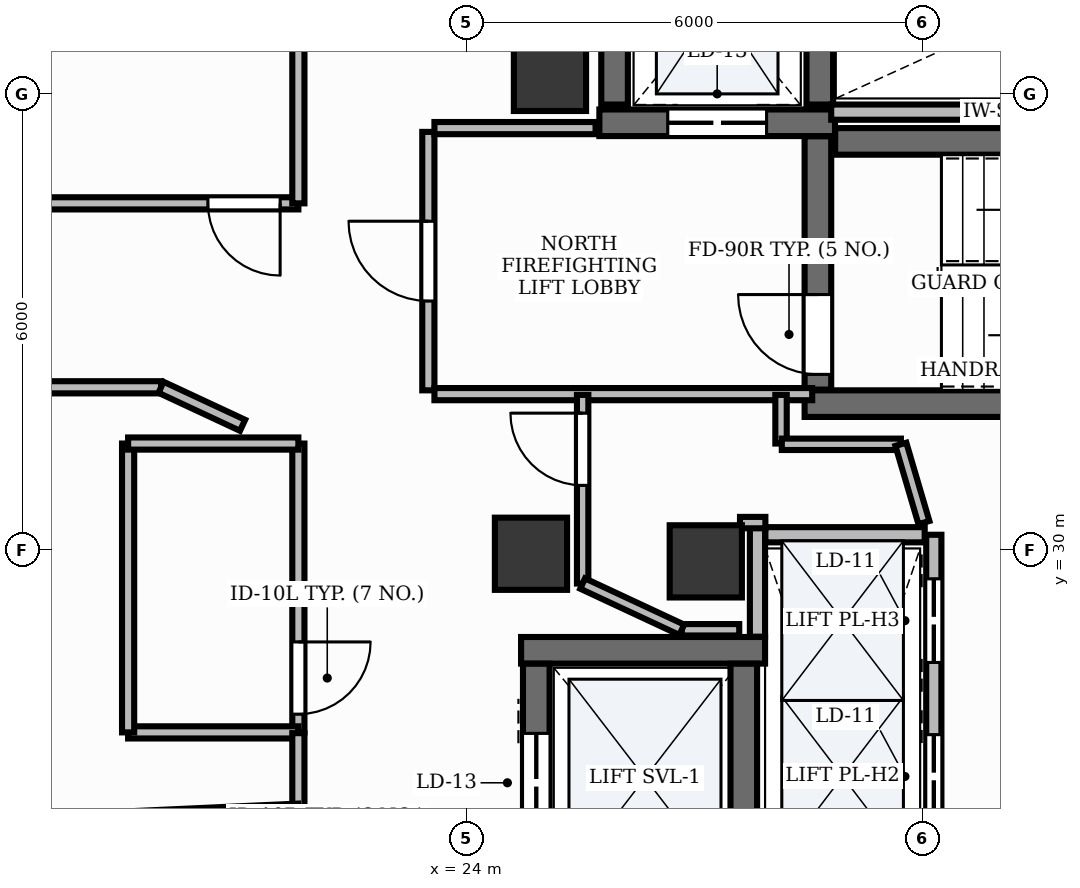
"""IFC4 building model, lengths in metres.
Left out: names, types, materials, properties, quantities, classifications, styles, units other than length and angle.
Written with IfcOpenShell. Run it as: python <this file> out.ifc"""

import sys

from ifc_helpers import new_model, si_unit, direction, frame, frame_2d, origin, origin_2d, place, context, subcontext, project, spatial, rectangle, extrude, element, fill, save


model = new_model("IFC4")
c1 = context("Model", 3, precision=1e-05, world=origin(), true_north=direction((0.0, 1.0)))
c2 = subcontext(c1, "Body", "Model", "MODEL_VIEW")
j1 = project(units=[si_unit("LENGTHUNIT", "METRE"), si_unit("PLANEANGLEUNIT", "RADIAN")], contexts=[c1])
p1 = place(None, origin())
s1 = spatial("IfcSite", under=j1, at=p1, CompositionType="ELEMENT")
p2 = place(p1, origin())
s2 = spatial("IfcBuilding", under=s1, at=p2, CompositionType="ELEMENT")
p3 = place(p2, frame((0.0, 0.0, 310.2)))
s3 = spatial("IfcBuildingStorey", under=s2, at=p3, CompositionType="ELEMENT", Elevation=310.2)
p4 = place(p3, frame((28.852, 35.375, 0.0), z_axis=(0.0, 0.0, 1.0), x_axis=(1.0, 0.0, 0.0)))
e1 = element("IfcWall", 1, at=p4, inside=s3, PredefinedType="SHEAR", context=c2, shape_type="SweptSolid", body=[
    extrude(rectangle(XDim=8.148, YDim=0.35, at=frame_2d((4.074, 0.0))), origin(), (0.0, 0.0, 1.0), 3.9),
])
p5 = place(p3, frame((28.45, 31.925, 0.0), z_axis=(0.0, 0.0, 1.0), x_axis=(1.0, 0.0, 0.0)))
e2 = element("IfcWall", 2, at=p5, inside=s3, PredefinedType="SHEAR", context=c2, shape_type="SweptSolid", body=[
    extrude(rectangle(XDim=8.55, YDim=0.35, at=frame_2d((4.275, 0.0))), origin(), (0.0, 0.0, 1.0), 3.9),
])
p6 = place(p3, frame((28.625, 32.11, 0.0), z_axis=(0.0, 0.0, 1.0), x_axis=(0.0, 1.0, 0.0)))
e3 = element("IfcWall", 3, at=p6, inside=s3, PredefinedType="SHEAR", context=c2, shape_type="SweptSolid", body=[
    extrude(rectangle(XDim=3.333, YDim=0.35, at=frame_2d((1.667, 0.0))), origin(), (0.0, 0.0, 1.0), 3.9),
])
p7 = place(p6, frame((0.2, 0.0, 0.0)))
e4 = element("IfcOpeningElement", 4, at=p7, cuts=e3, PredefinedType="OPENING", context=c2, shape_type="SweptSolid", body=[
    extrude(rectangle(XDim=1.05, YDim=2.15, at=frame_2d((0.525, 1.075))), frame((0.0, 0.19, 0.0), z_axis=(0.0, -1.0, 0.0), x_axis=(1.0, 0.0, 0.0)), (0.0, 0.0, 1.0), 0.38),
])
p8 = place(p3, frame((25.75, 35.62, 0.0), z_axis=(0.0, 0.0, 1.0), x_axis=(1.0, 0.0, 0.0)))
e5 = element("IfcWall", 5, at=p8, inside=s3, PredefinedType="SHEAR", context=c2, shape_type="SweptSolid", body=[
    extrude(rectangle(XDim=3.1, YDim=0.35, at=frame_2d((1.55, 0.0))), origin(), (0.0, 0.0, 1.0), 3.9),
])
p9 = place(p8, frame((0.9, 0.0, 0.0)))
e6 = element("IfcOpeningElement", 6, at=p9, cuts=e5, PredefinedType="OPENING", context=c2, shape_type="SweptSolid", body=[
    extrude(rectangle(XDim=1.3, YDim=2.2, at=frame_2d((0.65, 1.1))), frame((0.0, 0.19, 0.0), z_axis=(0.0, -1.0, 0.0), x_axis=(1.0, 0.0, 0.0)), (0.0, 0.0, 1.0), 0.38),
])
for number, where, z_axis, x_axis in (
    (7, (25.95, 35.86, 0.0), (0.0, 0.0, 1.0), (0.0, 1.0, 0.0)),
    (8, (28.65, 35.86, 0.0), (0.0, 0.0, 1.0), (0.0, 1.0, 0.0)),
):
    element("IfcWall", number, at=place(p3, frame(where, z_axis=z_axis, x_axis=x_axis)), inside=s3, PredefinedType="SHEAR", context=c2, shape_type="SweptSolid", body=[
        extrude(rectangle(XDim=2.7, YDim=0.35, at=frame_2d((1.35, 0.0))), origin(), (0.0, 0.0, 1.0), 3.9),
    ])
p10 = place(p3, frame((24.72, 28.68, 0.0), z_axis=(0.0, 0.0, 1.0), x_axis=(1.0, 0.0, 0.0)))
e9 = element("IfcWall", 9, at=p10, inside=s3, PredefinedType="SHEAR", context=c2, shape_type="SweptSolid", body=[
    extrude(rectangle(XDim=3.21, YDim=0.35, at=frame_2d((1.605, 0.0))), origin(), (0.0, 0.0, 1.0), 3.9),
])
p11 = place(p3, frame((24.92, 25.497, 0.0), z_axis=(0.0, 0.0, 1.0), x_axis=(0.0, 1.0, 0.0)))
e10 = element("IfcWall", 10, at=p11, inside=s3, PredefinedType="SHEAR", context=c2, shape_type="SweptSolid", body=[
    extrude(rectangle(XDim=3.006, YDim=0.35, at=frame_2d((1.503, 0.0))), origin(), (0.0, 0.0, 1.0), 3.9),
])
p12 = place(p11, frame((0.79, 0.0, 0.0)))
e11 = element("IfcOpeningElement", 11, at=p12, cuts=e10, PredefinedType="OPENING", context=c2, shape_type="SweptSolid", body=[
    extrude(rectangle(XDim=1.3, YDim=2.2, at=frame_2d((0.65, 1.1))), frame((0.0, 0.19, 0.0), z_axis=(0.0, -1.0, 0.0), x_axis=(1.0, 0.0, 0.0)), (0.0, 0.0, 1.0), 0.38),
])
p13 = place(p3, frame((27.65, 25.497, 0.0), z_axis=(0.0, 0.0, 1.0), x_axis=(0.0, 1.0, 0.0)))
e12 = element("IfcWall", 12, at=p13, inside=s3, PredefinedType="SHEAR", context=c2, shape_type="SweptSolid", body=[
    extrude(rectangle(XDim=3.006, YDim=0.35, at=frame_2d((1.503, 0.0))), origin(), (0.0, 0.0, 1.0), 3.9),
])
for number, where, z_axis, x_axis in (
    (13, (25.1, 36.25, -0.0), (0.0, 0.0, 1.0), (1.0, 0.0, 0.0)),
    (14, (24.85, 29.95, -0.0), (0.0, 0.0, 1.0), (1.0, 0.0, 0.0)),
    (15, (27.15, 29.85, -0.0), (0.0, 0.0, 1.0), (1.0, 0.0, 0.0)),
):
    element("IfcColumn", number, at=place(p3, frame(where, z_axis=z_axis, x_axis=x_axis)), inside=s3, PredefinedType="PILASTER", context=c2, shape_type="SweptSolid", body=[
        extrude(rectangle(XDim=0.95, YDim=0.95, at=origin_2d()), origin(), (0.0, 0.0, 1.0), 3.901),
    ])
p14 = place(p3, frame((27.83, 28.859, 0.0), z_axis=(0.0, 0.0, 1.0), x_axis=(0.0, 1.0, 0.0)))
e16 = element("IfcWall", 16, at=p14, inside=s3, PredefinedType="PARTITIONING", context=c2, shape_type="SweptSolid", body=[
    extrude(rectangle(XDim=1.441, YDim=0.2, at=frame_2d((0.721, 0.0))), origin(), (0.0, 0.0, 1.0), 2.91),
])
p15 = place(p3, frame((30.15, 23.85, 0.0), z_axis=(0.0, 0.0, 1.0), x_axis=(0.0, 1.0, 0.0)))
e17 = element("IfcWall", 17, at=p15, inside=s3, PredefinedType="PARTITIONING", context=c2, shape_type="SweptSolid", body=[
    extrude(rectangle(XDim=6.35, YDim=0.2, at=frame_2d((3.175, 0.0))), origin(), (0.0, 0.0, 1.0), 2.91),
])
p16 = place(p15, frame((0.58, 0.0, 0.0)))
e18 = element("IfcOpeningElement", 18, at=p16, cuts=e17, PredefinedType="OPENING", context=c2, shape_type="SweptSolid", body=[
    extrude(rectangle(XDim=1.1, YDim=2.2, at=frame_2d((0.55, 1.1))), frame((0.0, 0.115, 0.0), z_axis=(0.0, -1.0, 0.0), x_axis=(1.0, 0.0, 0.0)), (0.0, 0.0, 1.0), 0.23),
])
p17 = place(p15, frame((2.62, 0.0, 0.0)))
e19 = element("IfcOpeningElement", 19, at=p17, cuts=e17, PredefinedType="OPENING", context=c2, shape_type="SweptSolid", body=[
    extrude(rectangle(XDim=1.1, YDim=2.2, at=frame_2d((0.55, 1.1))), frame((0.0, 0.115, 0.0), z_axis=(0.0, -1.0, 0.0), x_axis=(1.0, 0.0, 0.0)), (0.0, 0.0, 1.0), 0.23),
])
p18 = place(p15, frame((4.67, 0.0, 0.0)))
e20 = element("IfcOpeningElement", 20, at=p18, cuts=e17, PredefinedType="OPENING", context=c2, shape_type="SweptSolid", body=[
    extrude(rectangle(XDim=1.1, YDim=2.2, at=frame_2d((0.55, 1.1))), frame((0.0, 0.115, 0.0), z_axis=(0.0, -1.0, 0.0), x_axis=(1.0, 0.0, 0.0)), (0.0, 0.0, 1.0), 0.23),
])
p19 = place(p3, frame((27.934, 30.2, 0.0), z_axis=(0.0, 0.0, 1.0), x_axis=(1.0, 0.0, 0.0)))
e21 = element("IfcWall", 21, at=p19, inside=s3, PredefinedType="PARTITIONING", context=c2, shape_type="SweptSolid", body=[
    extrude(rectangle(XDim=2.096, YDim=0.2, at=frame_2d((1.048, 0.0))), origin(), (0.0, 0.0, 1.0), 2.91),
])
p20 = place(p3, frame((28.8, 35.76, 0.0), z_axis=(0.0, 0.0, 1.0), x_axis=(1.0, 0.0, 0.0)))
e22 = element("IfcWall", 22, at=p20, inside=s3, PredefinedType="PARTITIONING", context=c2, shape_type="SweptSolid", body=[
    extrude(rectangle(XDim=4.57, YDim=0.2, at=frame_2d((2.285, 0.0))), origin(), (0.0, 0.0, 1.0), 2.91),
])
p21 = place(p3, frame((23.5, 32.1, 0.0), z_axis=(0.0, 0.0, 1.0), x_axis=(0.0, 1.0, 0.0)))
e23 = element("IfcWall", 23, at=p21, inside=s3, PredefinedType="PARTITIONING", context=c2, shape_type="SweptSolid", body=[
    extrude(rectangle(XDim=3.4, YDim=0.16, at=frame_2d((1.7, 0.0))), origin(), (0.0, 0.0, 1.0), 2.91),
])
p22 = place(p21, frame((1.175, 0.0, 0.0)))
e24 = element("IfcOpeningElement", 24, at=p22, cuts=e23, PredefinedType="OPENING", context=c2, shape_type="SweptSolid", body=[
    extrude(rectangle(XDim=1.05, YDim=2.15, at=frame_2d((0.525, 1.075))), frame((0.0, 0.095, 0.0), z_axis=(0.0, -1.0, 0.0), x_axis=(1.0, 0.0, 0.0)), (0.0, 0.0, 1.0), 0.19),
])
p23 = place(p3, frame((23.58, 32.05, 0.0), z_axis=(0.0, 0.0, 1.0), x_axis=(1.0, 0.0, 0.0)))
e25 = element("IfcWall", 25, at=p23, inside=s3, PredefinedType="PARTITIONING", context=c2, shape_type="SweptSolid", body=[
    extrude(rectangle(XDim=4.97, YDim=0.16, at=frame_2d((2.485, 0.0))), origin(), (0.0, 0.0, 1.0), 2.91),
])
p24 = place(p3, frame((23.58, 35.55, 0.0), z_axis=(0.0, 0.0, 1.0), x_axis=(1.0, 0.0, 0.0)))
e26 = element("IfcWall", 26, at=p24, inside=s3, PredefinedType="PARTITIONING", context=c2, shape_type="SweptSolid", body=[
    extrude(rectangle(XDim=2.12, YDim=0.16, at=frame_2d((1.06, 0.0))), origin(), (0.0, 0.0, 1.0), 2.91),
])
p25 = place(p3, frame((21.79, 31.4, 0.0), z_axis=(0.0, 0.0, 1.0), x_axis=(0.0, -1.0, 0.0)))
e27 = element("IfcWall", 27, at=p25, inside=s3, PredefinedType="PARTITIONING", context=c2, shape_type="SweptSolid", body=[
    extrude(rectangle(XDim=3.8, YDim=0.16, at=frame_2d((1.9, 0.0))), origin(), (0.0, 0.0, 1.0), 2.91),
])
p26 = place(p25, frame((2.61, 0.0, 0.0)))
e28 = element("IfcOpeningElement", 28, at=p26, cuts=e27, PredefinedType="OPENING", context=c2, shape_type="SweptSolid", body=[
    extrude(rectangle(XDim=0.95, YDim=2.15, at=frame_2d((0.475, 1.075))), frame((0.0, 0.095, 0.0), z_axis=(0.0, -1.0, 0.0), x_axis=(1.0, 0.0, 0.0)), (0.0, 0.0, 1.0), 0.19),
])
p27 = place(p3, frame((25.53, 29.558, 0.0), z_axis=(0.0, 0.0, 1.0), x_axis=(0.0, 1.0, 0.0)))
e29 = element("IfcWall", 29, at=p27, inside=s3, PredefinedType="PARTITIONING", context=c2, shape_type="SweptSolid", body=[
    extrude(rectangle(XDim=2.482, YDim=0.15, at=frame_2d((1.241, 0.0))), origin(), (0.0, 0.0, 1.0), 2.91),
])
p28 = place(p27, frame((1.292, 0.0, 0.0)))
e30 = element("IfcOpeningElement", 30, at=p28, cuts=e29, PredefinedType="OPENING", context=c2, shape_type="SweptSolid", body=[
    extrude(rectangle(XDim=0.95, YDim=2.15, at=frame_2d((0.475, 1.075))), frame((0.0, 0.09, 0.0), z_axis=(0.0, -1.0, 0.0), x_axis=(1.0, 0.0, 0.0)), (0.0, 0.0, 1.0), 0.18),
])
p29 = place(p3, frame((21.79, 34.56, 0.0), z_axis=(0.0, 0.0, 1.0), x_axis=(-1.0, 0.0, 0.0)))
e31 = element("IfcWall", 31, at=p29, inside=s3, PredefinedType="PARTITIONING", context=c2, shape_type="SweptSolid", body=[
    extrude(rectangle(XDim=3.99, YDim=0.16, at=frame_2d((1.995, 0.0))), origin(), (0.0, 0.0, 1.0), 2.91),
])
p30 = place(p29, frame((0.24, 0.0, 0.0)))
e32 = element("IfcOpeningElement", 32, at=p30, cuts=e31, PredefinedType="OPENING", context=c2, shape_type="SweptSolid", body=[
    extrude(rectangle(XDim=0.95, YDim=2.15, at=frame_2d((0.475, 1.075))), frame((0.0, 0.095, 0.0), z_axis=(0.0, -1.0, 0.0), x_axis=(1.0, 0.0, 0.0)), (0.0, 0.0, 1.0), 0.19),
])
p31 = place(p3, frame((21.79, 27.6, 0.0), z_axis=(0.0, 0.0, 1.0), x_axis=(-1.0, 0.0, 0.0)))
e33 = element("IfcWall", 33, at=p31, inside=s3, PredefinedType="PARTITIONING", context=c2, shape_type="SweptSolid", body=[
    extrude(rectangle(XDim=2.24, YDim=0.16, at=frame_2d((1.12, 0.0))), origin(), (0.0, 0.0, 1.0), 2.91),
])
p32 = place(p3, frame((19.55, 27.6, 0.0), z_axis=(0.0, 0.0, 1.0), x_axis=(0.0, 1.0, 0.0)))
e34 = element("IfcWall", 34, at=p32, inside=s3, PredefinedType="PARTITIONING", context=c2, shape_type="SweptSolid", body=[
    extrude(rectangle(XDim=3.8, YDim=0.16, at=frame_2d((1.9, 0.0))), origin(), (0.0, 0.0, 1.0), 2.91),
])
p33 = place(p3, frame((19.55, 31.4, 0.0), z_axis=(0.0, 0.0, 1.0), x_axis=(1.0, 0.0, 0.0)))
e35 = element("IfcWall", 35, at=p33, inside=s3, PredefinedType="PARTITIONING", context=c2, shape_type="SweptSolid", body=[
    extrude(rectangle(XDim=2.24, YDim=0.16, at=frame_2d((1.12, 0.0))), origin(), (0.0, 0.0, 1.0), 2.91),
])
p34 = place(p3, frame((27.934, 30.36, 0.0), z_axis=(0.0, 0.0, 1.0), x_axis=(-1.0, 0.0, 0.0)))
e36 = element("IfcWall", 36, at=p34, inside=s3, PredefinedType="PARTITIONING", context=c2, shape_type="SweptSolid", body=[
    extrude(rectangle(XDim=0.334, YDim=0.15, at=frame_2d((0.167, 0.0))), origin(), (0.0, 0.0, 1.0), 2.91),
])
p35 = place(p3, frame((27.59, 28.95, 0.0), z_axis=(0.0, 0.0, 1.0), x_axis=(-1.0, 0.0, 0.0)))
e37 = element("IfcWall", 37, at=p35, inside=s3, PredefinedType="PARTITIONING", context=c2, shape_type="SweptSolid", body=[
    extrude(rectangle(XDim=0.756, YDim=0.15, at=frame_2d((0.378, 0.0))), origin(), (0.0, 0.0, 1.0), 2.91),
])
p36 = place(p3, frame((26.834, 28.95, 0.0), z_axis=(0.0, 0.0, 1.0), x_axis=(-0.906248163901, 0.422746100427, 0.0)))
e38 = element("IfcWall", 38, at=p36, inside=s3, PredefinedType="PARTITIONING", context=c2, shape_type="SweptSolid", body=[
    extrude(rectangle(XDim=1.438, YDim=0.15, at=frame_2d((0.719, 0.0))), origin(), (0.0, 0.0, 1.0), 2.91),
])
p37 = place(p3, frame((28.14, 32.04, 0.0), z_axis=(0.0, 0.0, 1.0), x_axis=(0.0, -1.0, 0.0)))
e39 = element("IfcWall", 39, at=p37, inside=s3, PredefinedType="PARTITIONING", context=c2, shape_type="SweptSolid", body=[
    extrude(rectangle(XDim=0.64, YDim=0.15, at=frame_2d((0.32, 0.0))), origin(), (0.0, 0.0, 1.0), 2.91),
])
p38 = place(p3, frame((28.15, 31.39, 0.0), z_axis=(0.0, 0.0, 1.0), x_axis=(1.0, 0.0, 0.0)))
e40 = element("IfcWall", 40, at=p38, inside=s3, PredefinedType="PARTITIONING", context=c2, shape_type="SweptSolid", body=[
    extrude(rectangle(XDim=1.567, YDim=0.15, at=frame_2d((0.783, 0.0))), origin(), (0.0, 0.0, 1.0), 2.91),
])
p39 = place(p3, frame((29.717, 31.39, 0.0), z_axis=(0.0, 0.0, 1.0), x_axis=(0.282461818216, -0.959278542057, 0.0)))
e41 = element("IfcWall", 41, at=p39, inside=s3, PredefinedType="PARTITIONING", context=c2, shape_type="SweptSolid", body=[
    extrude(rectangle(XDim=1.073, YDim=0.15, at=frame_2d((0.537, 0.0))), origin(), (0.0, 0.0, 1.0), 2.91),
])
p40 = place(p3, frame((21.79, 40.75, 0.0), z_axis=(0.0, 0.0, 1.0), x_axis=(0.0, -1.0, 0.0)))
e42 = element("IfcWall", 42, at=p40, inside=s3, PredefinedType="PARTITIONING", context=c2, shape_type="SweptSolid", body=[
    extrude(rectangle(XDim=6.19, YDim=0.16, at=frame_2d((3.095, 0.0))), origin(), (0.0, 0.0, 1.0), 2.91),
])
p41 = place(p3, frame((17.8, 32.14, 0.0), z_axis=(0.0, 0.0, 1.0), x_axis=(1.0, 0.0, 0.0)))
e43 = element("IfcWall", 43, at=p41, inside=s3, PredefinedType="PARTITIONING", context=c2, shape_type="SweptSolid", body=[
    extrude(rectangle(XDim=2.183, YDim=0.16, at=frame_2d((1.092, 0.0))), origin(), (0.0, 0.0, 1.0), 2.91),
])
p42 = place(p3, frame((19.983, 32.14, 0.0), z_axis=(0.0, 0.0, 1.0), x_axis=(0.906309623455, -0.422614323506, 0.0)))
e44 = element("IfcWall", 44, at=p42, inside=s3, PredefinedType="PARTITIONING", context=c2, shape_type="SweptSolid", body=[
    extrude(rectangle(XDim=1.183, YDim=0.16, at=frame_2d((0.592, 0.0))), origin(), (0.0, 0.0, 1.0), 2.91),
])
p43 = place(p3, frame((21.79, 27.59, 0.0), z_axis=(0.0, 0.0, 1.0), x_axis=(0.0, -1.0, 0.0)))
e45 = element("IfcWall", 45, at=p43, inside=s3, PredefinedType="PARTITIONING", context=c2, shape_type="SweptSolid", body=[
    extrude(rectangle(XDim=1.007, YDim=0.16, at=frame_2d((0.503, 0.0))), origin(), (0.0, 0.0, 1.0), 2.91),
])
p44 = place(p3, frame((21.79, 26.583, 0.0), z_axis=(0.0, 0.0, 1.0), x_axis=(-0.998971085975, -0.045351619434, 0.0)))
e46 = element("IfcWall", 46, at=p44, inside=s3, PredefinedType="PARTITIONING", context=c2, shape_type="SweptSolid", body=[
    extrude(rectangle(XDim=4.743, YDim=0.16, at=frame_2d((2.371, 0.0))), origin(), (0.0, 0.0, 1.0), 2.91),
])
p45 = place(p7, origin())
e47 = element("IfcDoor", 47, at=p45, inside=s3, OperationType="SINGLE_SWING_RIGHT", PredefinedType="DOOR", context=c2, shape_type="SweptSolid", body=[
    extrude(rectangle(XDim=1.05, YDim=2.15, at=frame_2d((0.525, 1.075))), frame((0.0, 0.025, 0.0), z_axis=(0.0, -1.0, 0.0), x_axis=(1.0, 0.0, 0.0)), (0.0, 0.0, 1.0), 0.05),
])
fill(e4, e47)
p46 = place(p17, origin())
e48 = element("IfcDoor", 48, at=p46, inside=s3, OperationType="DOUBLE_DOOR_SLIDING", PredefinedType="DOOR", context=c2, shape_type="SweptSolid", body=[
    extrude(rectangle(XDim=1.1, YDim=2.2, at=frame_2d((0.55, 1.1))), frame((0.0, 0.025, 0.0), z_axis=(0.0, -1.0, 0.0), x_axis=(1.0, 0.0, 0.0)), (0.0, 0.0, 1.0), 0.05),
])
fill(e19, e48)
p47 = place(p18, origin())
e49 = element("IfcDoor", 49, at=p47, inside=s3, OperationType="DOUBLE_DOOR_SLIDING", PredefinedType="DOOR", context=c2, shape_type="SweptSolid", body=[
    extrude(rectangle(XDim=1.1, YDim=2.2, at=frame_2d((0.55, 1.1))), frame((0.0, 0.025, 0.0), z_axis=(0.0, -1.0, 0.0), x_axis=(1.0, 0.0, 0.0)), (0.0, 0.0, 1.0), 0.05),
])
fill(e20, e49)
p48 = place(p9, origin())
e50 = element("IfcDoor", 50, at=p48, inside=s3, OperationType="DOUBLE_DOOR_SLIDING", PredefinedType="DOOR", context=c2, shape_type="SweptSolid", body=[
    extrude(rectangle(XDim=1.3, YDim=2.2, at=frame_2d((0.65, 1.1))), frame((0.0, 0.025, 0.0), z_axis=(0.0, -1.0, 0.0), x_axis=(1.0, 0.0, 0.0)), (0.0, 0.0, 1.0), 0.05),
])
fill(e6, e50)
p49 = place(p12, origin())
e51 = element("IfcDoor", 51, at=p49, inside=s3, OperationType="DOUBLE_DOOR_SLIDING", PredefinedType="DOOR", context=c2, shape_type="SweptSolid", body=[
    extrude(rectangle(XDim=1.3, YDim=2.2, at=frame_2d((0.65, 1.1))), frame((0.0, 0.025, 0.0), z_axis=(0.0, -1.0, 0.0), x_axis=(1.0, 0.0, 0.0)), (0.0, 0.0, 1.0), 0.05),
])
fill(e11, e51)
p50 = place(p22, origin())
e52 = element("IfcDoor", 52, at=p50, inside=s3, OperationType="SINGLE_SWING_RIGHT", PredefinedType="DOOR", context=c2, shape_type="SweptSolid", body=[
    extrude(rectangle(XDim=1.05, YDim=2.15, at=frame_2d((0.525, 1.075))), frame((0.0, 0.025, 0.0), z_axis=(0.0, -1.0, 0.0), x_axis=(1.0, 0.0, 0.0)), (0.0, 0.0, 1.0), 0.05),
])
fill(e24, e52)
p51 = place(p26, origin())
e53 = element("IfcDoor", 53, at=p51, inside=s3, OperationType="SINGLE_SWING_LEFT", PredefinedType="DOOR", context=c2, shape_type="SweptSolid", body=[
    extrude(rectangle(XDim=0.95, YDim=2.15, at=frame_2d((0.475, 1.075))), frame((0.0, 0.025, 0.0), z_axis=(0.0, -1.0, 0.0), x_axis=(1.0, 0.0, 0.0)), (0.0, 0.0, 1.0), 0.05),
])
fill(e28, e53)
p52 = place(p28, origin())
e54 = element("IfcDoor", 54, at=p52, inside=s3, OperationType="SINGLE_SWING_RIGHT", PredefinedType="DOOR", context=c2, shape_type="SweptSolid", body=[
    extrude(rectangle(XDim=0.95, YDim=2.15, at=frame_2d((0.475, 1.075))), frame((0.0, 0.025, 0.0), z_axis=(0.0, -1.0, 0.0), x_axis=(1.0, 0.0, 0.0)), (0.0, 0.0, 1.0), 0.05),
])
fill(e30, e54)
p53 = place(p30, origin())
e55 = element("IfcDoor", 55, at=p53, inside=s3, OperationType="SINGLE_SWING_LEFT", PredefinedType="DOOR", context=c2, shape_type="SweptSolid", body=[
    extrude(rectangle(XDim=0.95, YDim=2.15, at=frame_2d((0.475, 1.075))), frame((0.0, 0.025, 0.0), z_axis=(0.0, -1.0, 0.0), x_axis=(1.0, 0.0, 0.0)), (0.0, 0.0, 1.0), 0.05),
])
fill(e32, e55)
save(model, sys.argv[1])
